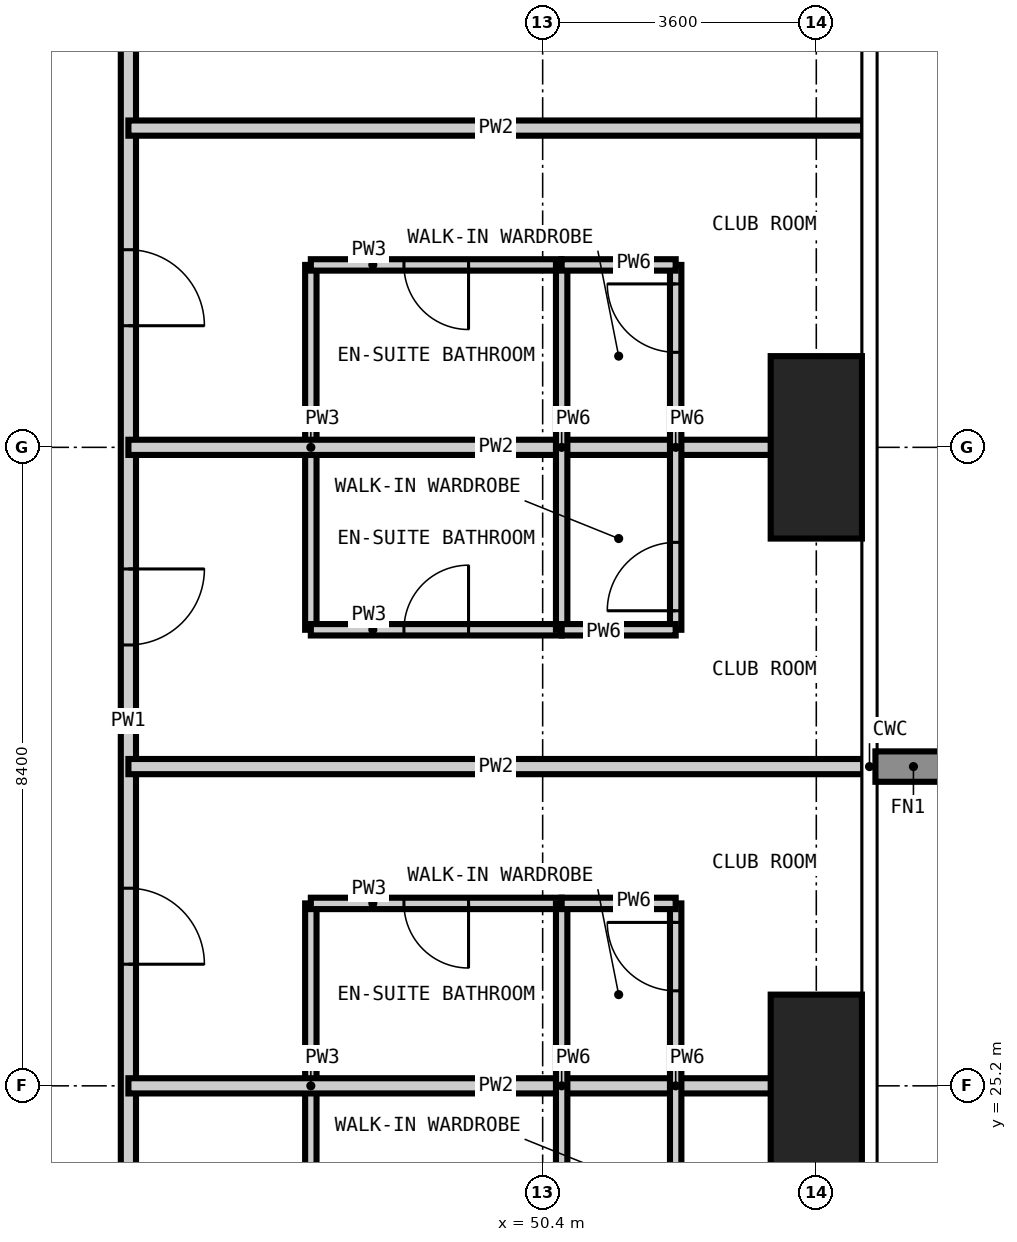
"""IFC4 building model, lengths in metres.
Left out: names, types, materials, properties, quantities, classifications, styles, units other than length and angle.
Written with IfcOpenShell. Run it as: python <this file> out.ifc"""

import sys

from ifc_helpers import new_model, si_unit, direction, frame, frame_2d, origin, origin_2d, place, context, subcontext, project, spatial, rectangle, extrude, element, fill, save


model = new_model("IFC4")
c1 = context("Model", 3, precision=1e-05, world=origin(), true_north=direction((0.0, 1.0)))
c2 = subcontext(c1, "Body", "Model", "MODEL_VIEW")
j1 = project(units=[si_unit("LENGTHUNIT", "METRE"), si_unit("PLANEANGLEUNIT", "RADIAN")], contexts=[c1])
p1 = place(None, origin())
s1 = spatial("IfcSite", under=j1, at=p1, CompositionType="ELEMENT")
p2 = place(p1, origin())
s2 = spatial("IfcBuilding", under=s1, at=p2, CompositionType="ELEMENT")
p3 = place(p2, frame((0.0, 0.0, 177.0)))
s3 = spatial("IfcBuildingStorey", under=s2, at=p3, CompositionType="ELEMENT", Elevation=177.0)
for number, where, z_axis, x_axis in (
    (1, (54.0, 25.2, -0.35), (0.0, 0.0, 1.0), (1.0, 0.0, 0.0)),
    (2, (54.0, 33.6, -0.35), (0.0, 0.0, 1.0), (1.0, 0.0, 0.0)),
):
    element("IfcColumn", number, at=place(p3, frame(where, z_axis=z_axis, x_axis=x_axis)), inside=s3, PredefinedType="COLUMN", context=c2, shape_type="SweptSolid", body=[
        extrude(rectangle(XDim=1.2, YDim=2.4, at=origin_2d()), origin(), (0.0, 0.0, 1.0), 3.6),
    ])
for number, where, z_axis, x_axis in (
    (3, (47.35, 22.8, 0.0), (0.0, 0.0, 1.0), (0.0, 1.0, 0.0)),
    (4, (47.35, 31.2, 0.0), (0.0, 0.0, 1.0), (0.0, 1.0, 0.0)),
):
    element("IfcWall", number, at=place(p3, frame(where, z_axis=z_axis, x_axis=x_axis)), inside=s3, PredefinedType="PARTITIONING", context=c2, shape_type="SweptSolid", body=[
        extrude(rectangle(XDim=4.8, YDim=0.15, at=frame_2d((2.4, 0.0))), origin(), (0.0, 0.0, 1.0), 3.25),
    ])
p4 = place(p3, frame((47.35, 27.6, 0.0), z_axis=(0.0, 0.0, 1.0), x_axis=(1.0, 0.0, 0.0)))
e5 = element("IfcWall", 5, at=p4, inside=s3, PredefinedType="PARTITIONING", context=c2, shape_type="SweptSolid", body=[
    extrude(rectangle(XDim=3.3, YDim=0.15, at=frame_2d((1.65, 0.0))), origin(), (0.0, 0.0, 1.0), 3.25),
])
p5 = place(p4, frame((1.225, 0.0, 0.0)))
e6 = element("IfcOpeningElement", 6, at=p5, cuts=e5, PredefinedType="OPENING", context=c2, shape_type="SweptSolid", body=[
    extrude(rectangle(XDim=0.85, YDim=2.1, at=frame_2d((0.425, 1.05))), frame((0.0, 0.085, 0.0), z_axis=(0.0, -1.0, 0.0), x_axis=(1.0, 0.0, 0.0)), (0.0, 0.0, 1.0), 0.17),
])
p6 = place(p3, frame((47.35, 31.2, 0.0), z_axis=(0.0, 0.0, 1.0), x_axis=(1.0, 0.0, 0.0)))
e7 = element("IfcWall", 7, at=p6, inside=s3, PredefinedType="PARTITIONING", context=c2, shape_type="SweptSolid", body=[
    extrude(rectangle(XDim=3.3, YDim=0.15, at=frame_2d((1.65, 0.0))), origin(), (0.0, 0.0, 1.0), 3.25),
])
p7 = place(p6, frame((1.225, 0.0, 0.0)))
e8 = element("IfcOpeningElement", 8, at=p7, cuts=e7, PredefinedType="OPENING", context=c2, shape_type="SweptSolid", body=[
    extrude(rectangle(XDim=0.85, YDim=2.1, at=frame_2d((0.425, 1.05))), frame((0.0, 0.085, 0.0), z_axis=(0.0, -1.0, 0.0), x_axis=(1.0, 0.0, 0.0)), (0.0, 0.0, 1.0), 0.17),
])
p8 = place(p3, frame((47.35, 36.0, 0.0), z_axis=(0.0, 0.0, 1.0), x_axis=(1.0, 0.0, 0.0)))
e9 = element("IfcWall", 9, at=p8, inside=s3, PredefinedType="PARTITIONING", context=c2, shape_type="SweptSolid", body=[
    extrude(rectangle(XDim=3.3, YDim=0.15, at=frame_2d((1.65, 0.0))), origin(), (0.0, 0.0, 1.0), 3.25),
])
p9 = place(p8, frame((1.225, 0.0, 0.0)))
e10 = element("IfcOpeningElement", 10, at=p9, cuts=e9, PredefinedType="OPENING", context=c2, shape_type="SweptSolid", body=[
    extrude(rectangle(XDim=0.85, YDim=2.1, at=frame_2d((0.425, 1.05))), frame((0.0, 0.085, 0.0), z_axis=(0.0, -1.0, 0.0), x_axis=(1.0, 0.0, 0.0)), (0.0, 0.0, 1.0), 0.17),
])
p10 = place(p3, frame((44.95, 45.55, 0.0), z_axis=(0.0, 0.0, 1.0), x_axis=(0.0, -1.0, 0.0)))
e11 = element("IfcWall", 11, at=p10, inside=s3, PredefinedType="PARTITIONING", context=c2, shape_type="SweptSolid", body=[
    extrude(rectangle(XDim=31.1, YDim=0.2, at=frame_2d((15.55, 0.0))), origin(), (0.0, 0.0, 1.0), 3.25),
])
p11 = place(p10, frame((26.15, 0.0, 0.0)))
e12 = element("IfcOpeningElement", 12, at=p11, cuts=e11, PredefinedType="OPENING", context=c2, shape_type="SweptSolid", body=[
    extrude(rectangle(XDim=1.0, YDim=2.2, at=frame_2d((0.5, 1.1))), frame((0.0, 0.11, 0.0), z_axis=(0.0, -1.0, 0.0), x_axis=(1.0, 0.0, 0.0)), (0.0, 0.0, 1.0), 0.22),
])
p12 = place(p10, frame((21.95, 0.0, 0.0)))
e13 = element("IfcOpeningElement", 13, at=p12, cuts=e11, PredefinedType="OPENING", context=c2, shape_type="SweptSolid", body=[
    extrude(rectangle(XDim=1.0, YDim=2.2, at=frame_2d((0.5, 1.1))), frame((0.0, 0.11, 0.0), z_axis=(0.0, -1.0, 0.0), x_axis=(1.0, 0.0, 0.0)), (0.0, 0.0, 1.0), 0.22),
])
p13 = place(p10, frame((17.75, 0.0, 0.0)))
e14 = element("IfcOpeningElement", 14, at=p13, cuts=e11, PredefinedType="OPENING", context=c2, shape_type="SweptSolid", body=[
    extrude(rectangle(XDim=1.0, YDim=2.2, at=frame_2d((0.5, 1.1))), frame((0.0, 0.11, 0.0), z_axis=(0.0, -1.0, 0.0), x_axis=(1.0, 0.0, 0.0)), (0.0, 0.0, 1.0), 0.22),
])
p14 = place(p10, frame((13.55, 0.0, 0.0)))
e15 = element("IfcOpeningElement", 15, at=p14, cuts=e11, PredefinedType="OPENING", context=c2, shape_type="SweptSolid", body=[
    extrude(rectangle(XDim=1.0, YDim=2.2, at=frame_2d((0.5, 1.1))), frame((0.0, 0.11, 0.0), z_axis=(0.0, -1.0, 0.0), x_axis=(1.0, 0.0, 0.0)), (0.0, 0.0, 1.0), 0.22),
])
p15 = place(p10, frame((9.35, 0.0, 0.0)))
e16 = element("IfcOpeningElement", 16, at=p15, cuts=e11, PredefinedType="OPENING", context=c2, shape_type="SweptSolid", body=[
    extrude(rectangle(XDim=1.0, YDim=2.2, at=frame_2d((0.5, 1.1))), frame((0.0, 0.11, 0.0), z_axis=(0.0, -1.0, 0.0), x_axis=(1.0, 0.0, 0.0)), (0.0, 0.0, 1.0), 0.22),
])
p16 = place(p10, frame((5.15, 0.0, 0.0)))
e17 = element("IfcOpeningElement", 17, at=p16, cuts=e11, PredefinedType="OPENING", context=c2, shape_type="SweptSolid", body=[
    extrude(rectangle(XDim=1.0, YDim=2.2, at=frame_2d((0.5, 1.1))), frame((0.0, 0.11, 0.0), z_axis=(0.0, -1.0, 0.0), x_axis=(1.0, 0.0, 0.0)), (0.0, 0.0, 1.0), 0.22),
])
p17 = place(p10, frame((29.425, 0.0, 0.0)))
e18 = element("IfcOpeningElement", 18, at=p17, cuts=e11, PredefinedType="OPENING", context=c2, shape_type="SweptSolid", body=[
    extrude(rectangle(XDim=1.0, YDim=2.2, at=frame_2d((0.5, 1.1))), frame((0.0, 0.11, 0.0), z_axis=(0.0, -1.0, 0.0), x_axis=(1.0, 0.0, 0.0)), (0.0, 0.0, 1.0), 0.22),
])
p18 = place(p10, frame((1.275, 0.0, 0.0)))
e19 = element("IfcOpeningElement", 19, at=p18, cuts=e11, PredefinedType="OPENING", context=c2, shape_type="SweptSolid", body=[
    extrude(rectangle(XDim=1.0, YDim=2.2, at=frame_2d((0.5, 1.1))), frame((0.0, 0.11, 0.0), z_axis=(0.0, -1.0, 0.0), x_axis=(1.0, 0.0, 0.0)), (0.0, 0.0, 1.0), 0.22),
])
for number, where, z_axis, x_axis in (
    (20, (44.95, 25.2, 0.0), (0.0, 0.0, 1.0), (1.0, 0.0, 0.0)),
    (21, (44.95, 29.4, 0.0), (0.0, 0.0, 1.0), (1.0, 0.0, 0.0)),
    (22, (44.95, 33.6, 0.0), (0.0, 0.0, 1.0), (1.0, 0.0, 0.0)),
    (23, (44.95, 37.8, 0.0), (0.0, 0.0, 1.0), (1.0, 0.0, 0.0)),
):
    element("IfcWall", number, at=place(p3, frame(where, z_axis=z_axis, x_axis=x_axis)), inside=s3, PredefinedType="PARTITIONING", context=c2, shape_type="SweptSolid", body=[
        extrude(rectangle(XDim=9.668, YDim=0.2, at=frame_2d((4.834, 0.0))), origin(), (0.0, 0.0, 1.0), 3.25),
    ])
for number, where, z_axis, x_axis in (
    (24, (50.65, 22.8, 0.0), (0.0, 0.0, 1.0), (0.0, 1.0, 0.0)),
    (25, (50.65, 31.2, 0.0), (0.0, 0.0, 1.0), (0.0, 1.0, 0.0)),
):
    element("IfcWall", number, at=place(p3, frame(where, z_axis=z_axis, x_axis=x_axis)), inside=s3, PredefinedType="PARTITIONING", context=c2, shape_type="SweptSolid", body=[
        extrude(rectangle(XDim=4.8, YDim=0.15, at=frame_2d((2.4, 0.0))), origin(), (0.0, 0.0, 1.0), 3.25),
    ])
p19 = place(p3, frame((52.15, 22.8, 0.0), z_axis=(0.0, 0.0, 1.0), x_axis=(0.0, 1.0, 0.0)))
e26 = element("IfcWall", 26, at=p19, inside=s3, PredefinedType="PARTITIONING", context=c2, shape_type="SweptSolid", body=[
    extrude(rectangle(XDim=4.8, YDim=0.15, at=frame_2d((2.4, 0.0))), origin(), (0.0, 0.0, 1.0), 3.25),
])
p20 = place(p19, frame((0.25, 0.0, 0.0)))
e27 = element("IfcOpeningElement", 27, at=p20, cuts=e26, PredefinedType="OPENING", context=c2, shape_type="SweptSolid", body=[
    extrude(rectangle(XDim=0.9, YDim=2.1, at=frame_2d((0.45, 1.05))), frame((0.0, 0.085, 0.0), z_axis=(0.0, -1.0, 0.0), x_axis=(1.0, 0.0, 0.0)), (0.0, 0.0, 1.0), 0.17),
])
p21 = place(p19, frame((3.65, 0.0, 0.0)))
e28 = element("IfcOpeningElement", 28, at=p21, cuts=e26, PredefinedType="OPENING", context=c2, shape_type="SweptSolid", body=[
    extrude(rectangle(XDim=0.9, YDim=2.1, at=frame_2d((0.45, 1.05))), frame((0.0, 0.085, 0.0), z_axis=(0.0, -1.0, 0.0), x_axis=(1.0, 0.0, 0.0)), (0.0, 0.0, 1.0), 0.17),
])
p22 = place(p3, frame((52.15, 31.2, 0.0), z_axis=(0.0, 0.0, 1.0), x_axis=(0.0, 1.0, 0.0)))
e29 = element("IfcWall", 29, at=p22, inside=s3, PredefinedType="PARTITIONING", context=c2, shape_type="SweptSolid", body=[
    extrude(rectangle(XDim=4.8, YDim=0.15, at=frame_2d((2.4, 0.0))), origin(), (0.0, 0.0, 1.0), 3.25),
])
p23 = place(p22, frame((0.25, 0.0, 0.0)))
e30 = element("IfcOpeningElement", 30, at=p23, cuts=e29, PredefinedType="OPENING", context=c2, shape_type="SweptSolid", body=[
    extrude(rectangle(XDim=0.9, YDim=2.1, at=frame_2d((0.45, 1.05))), frame((0.0, 0.085, 0.0), z_axis=(0.0, -1.0, 0.0), x_axis=(1.0, 0.0, 0.0)), (0.0, 0.0, 1.0), 0.17),
])
p24 = place(p22, frame((3.65, 0.0, 0.0)))
e31 = element("IfcOpeningElement", 31, at=p24, cuts=e29, PredefinedType="OPENING", context=c2, shape_type="SweptSolid", body=[
    extrude(rectangle(XDim=0.9, YDim=2.1, at=frame_2d((0.45, 1.05))), frame((0.0, 0.085, 0.0), z_axis=(0.0, -1.0, 0.0), x_axis=(1.0, 0.0, 0.0)), (0.0, 0.0, 1.0), 0.17),
])
for number, where, z_axis, x_axis in (
    (32, (50.65, 27.6, 0.0), (0.0, 0.0, 1.0), (1.0, 0.0, 0.0)),
    (33, (50.65, 31.2, 0.0), (0.0, 0.0, 1.0), (1.0, 0.0, 0.0)),
    (34, (50.65, 36.0, 0.0), (0.0, 0.0, 1.0), (1.0, 0.0, 0.0)),
):
    element("IfcWall", number, at=place(p3, frame(where, z_axis=z_axis, x_axis=x_axis)), inside=s3, PredefinedType="PARTITIONING", context=c2, shape_type="SweptSolid", body=[
        extrude(rectangle(XDim=1.5, YDim=0.15, at=frame_2d((0.75, 0.0))), origin(), (0.0, 0.0, 1.0), 3.25),
    ])
p25 = place(p13, origin())
e35 = element("IfcDoor", 35, at=p25, inside=s3, OperationType="SINGLE_SWING_RIGHT", PredefinedType="DOOR", context=c2, shape_type="SweptSolid", body=[
    extrude(rectangle(XDim=1.0, YDim=2.2, at=frame_2d((0.5, 1.1))), frame((0.0, 0.025, 0.0), z_axis=(0.0, -1.0, 0.0), x_axis=(1.0, 0.0, 0.0)), (0.0, 0.0, 1.0), 0.05),
])
fill(e14, e35)
p26 = place(p5, frame((0.85, 0.0, 0.0), z_axis=(0.0, 0.0, 1.0), x_axis=(-1.0, 0.0, 0.0)))
e36 = element("IfcDoor", 36, at=p26, inside=s3, OperationType="SINGLE_SWING_LEFT", PredefinedType="DOOR", context=c2, shape_type="SweptSolid", body=[
    extrude(rectangle(XDim=0.85, YDim=2.1, at=frame_2d((0.425, 1.05))), frame((0.0, 0.025, 0.0), z_axis=(0.0, -1.0, 0.0), x_axis=(1.0, 0.0, 0.0)), (0.0, 0.0, 1.0), 0.05),
])
fill(e6, e36)
p27 = place(p21, origin())
e37 = element("IfcDoor", 37, at=p27, inside=s3, OperationType="SINGLE_SWING_RIGHT", PredefinedType="DOOR", context=c2, shape_type="SweptSolid", body=[
    extrude(rectangle(XDim=0.9, YDim=2.1, at=frame_2d((0.45, 1.05))), frame((0.0, 0.025, 0.0), z_axis=(0.0, -1.0, 0.0), x_axis=(1.0, 0.0, 0.0)), (0.0, 0.0, 1.0), 0.05),
])
fill(e28, e37)
p28 = place(p14, origin())
e38 = element("IfcDoor", 38, at=p28, inside=s3, OperationType="SINGLE_SWING_LEFT", PredefinedType="DOOR", context=c2, shape_type="SweptSolid", body=[
    extrude(rectangle(XDim=1.0, YDim=2.2, at=frame_2d((0.5, 1.1))), frame((0.0, 0.025, 0.0), z_axis=(0.0, -1.0, 0.0), x_axis=(1.0, 0.0, 0.0)), (0.0, 0.0, 1.0), 0.05),
])
fill(e15, e38)
p29 = place(p7, origin())
e39 = element("IfcDoor", 39, at=p29, inside=s3, OperationType="SINGLE_SWING_RIGHT", PredefinedType="DOOR", context=c2, shape_type="SweptSolid", body=[
    extrude(rectangle(XDim=0.85, YDim=2.1, at=frame_2d((0.425, 1.05))), frame((0.0, 0.025, 0.0), z_axis=(0.0, -1.0, 0.0), x_axis=(1.0, 0.0, 0.0)), (0.0, 0.0, 1.0), 0.05),
])
fill(e8, e39)
p30 = place(p23, origin())
e40 = element("IfcDoor", 40, at=p30, inside=s3, OperationType="SINGLE_SWING_LEFT", PredefinedType="DOOR", context=c2, shape_type="SweptSolid", body=[
    extrude(rectangle(XDim=0.9, YDim=2.1, at=frame_2d((0.45, 1.05))), frame((0.0, 0.025, 0.0), z_axis=(0.0, -1.0, 0.0), x_axis=(1.0, 0.0, 0.0)), (0.0, 0.0, 1.0), 0.05),
])
fill(e30, e40)
p31 = place(p15, origin())
e41 = element("IfcDoor", 41, at=p31, inside=s3, OperationType="SINGLE_SWING_RIGHT", PredefinedType="DOOR", context=c2, shape_type="SweptSolid", body=[
    extrude(rectangle(XDim=1.0, YDim=2.2, at=frame_2d((0.5, 1.1))), frame((0.0, 0.025, 0.0), z_axis=(0.0, -1.0, 0.0), x_axis=(1.0, 0.0, 0.0)), (0.0, 0.0, 1.0), 0.05),
])
fill(e16, e41)
p32 = place(p9, frame((0.85, 0.0, 0.0), z_axis=(0.0, 0.0, 1.0), x_axis=(-1.0, 0.0, 0.0)))
e42 = element("IfcDoor", 42, at=p32, inside=s3, OperationType="SINGLE_SWING_LEFT", PredefinedType="DOOR", context=c2, shape_type="SweptSolid", body=[
    extrude(rectangle(XDim=0.85, YDim=2.1, at=frame_2d((0.425, 1.05))), frame((0.0, 0.025, 0.0), z_axis=(0.0, -1.0, 0.0), x_axis=(1.0, 0.0, 0.0)), (0.0, 0.0, 1.0), 0.05),
])
fill(e10, e42)
p33 = place(p24, origin())
e43 = element("IfcDoor", 43, at=p33, inside=s3, OperationType="SINGLE_SWING_RIGHT", PredefinedType="DOOR", context=c2, shape_type="SweptSolid", body=[
    extrude(rectangle(XDim=0.9, YDim=2.1, at=frame_2d((0.45, 1.05))), frame((0.0, 0.025, 0.0), z_axis=(0.0, -1.0, 0.0), x_axis=(1.0, 0.0, 0.0)), (0.0, 0.0, 1.0), 0.05),
])
fill(e31, e43)
save(model, sys.argv[1])
